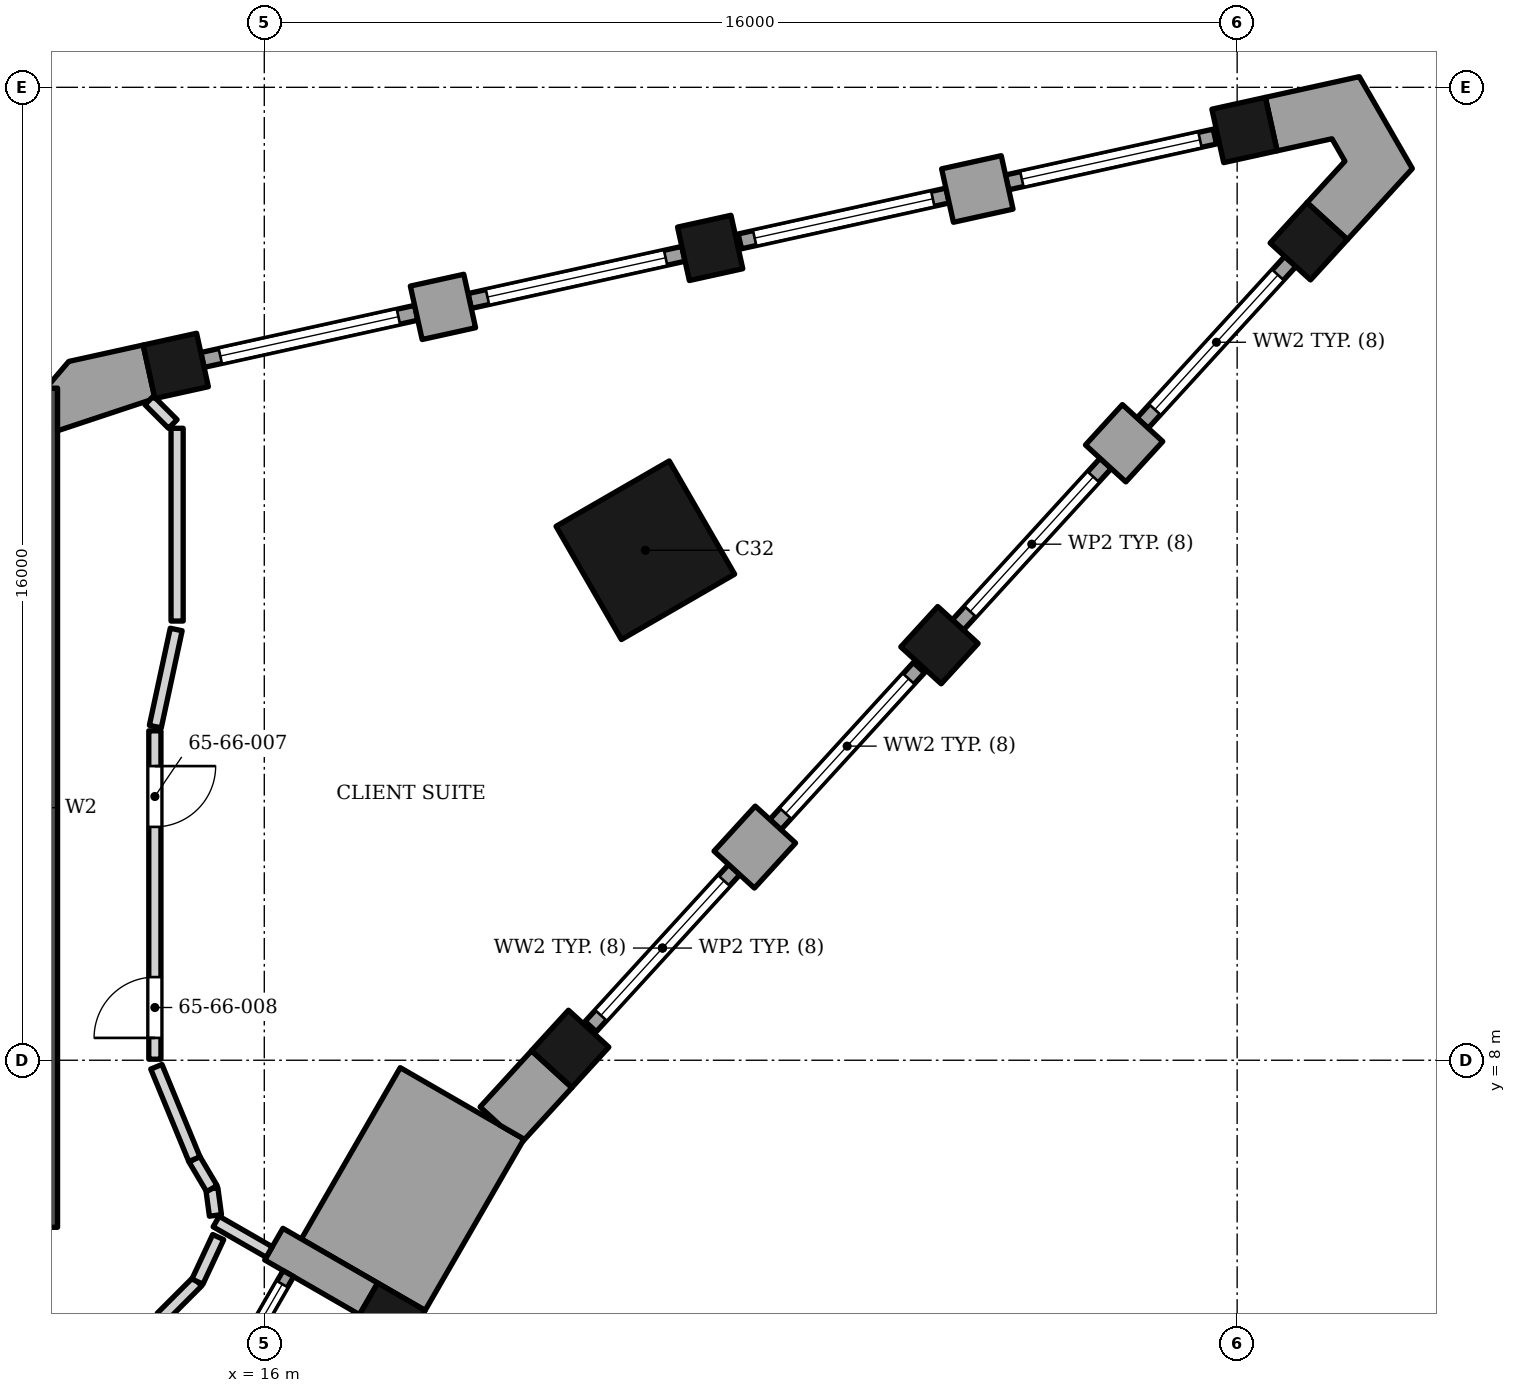
"""IFC4 building model, lengths in metres.
Left out: names, types, materials, properties, quantities, classifications, styles, units other than length and angle.
Written with IfcOpenShell. Run it as: python <this file> out.ifc"""

import sys

from ifc_helpers import new_model, si_unit, direction, frame, frame_2d, origin, origin_2d, place, context, subcontext, project, spatial, polyline, rectangle, outline, extrude, element, fill, save


model = new_model("IFC4")
c1 = context("Model", 3, precision=1e-05, world=origin(), true_north=direction((0.0, 1.0)))
c2 = subcontext(c1, "Body", "Model", "MODEL_VIEW")
j1 = project(units=[si_unit("LENGTHUNIT", "METRE"), si_unit("PLANEANGLEUNIT", "RADIAN")], contexts=[c1])
p1 = place(None, origin())
s1 = spatial("IfcSite", under=j1, at=p1, CompositionType="ELEMENT")
p2 = place(p1, origin())
s2 = spatial("IfcBuilding", under=s1, at=p2, CompositionType="ELEMENT")
p3 = place(p2, frame((0.0, 0.0, 271.6)))
s3 = spatial("IfcBuildingStorey", under=s2, at=p3, CompositionType="ELEMENT", Elevation=271.6)
p4 = place(p3, frame((12.35, 5.253, 0.0), z_axis=(0.0, 0.0, 1.0), x_axis=(0.0, 1.0, 0.0)))
e1 = element("IfcWall", 1, at=p4, inside=s3, PredefinedType="SHEAR", context=c2, shape_type="SweptSolid", body=[
    extrude(rectangle(XDim=13.8, YDim=0.5, at=frame_2d((6.9, 0.0))), origin(), (0.0, 0.0, 1.0), 3.9),
])
p5 = place(p3, frame((22.267, 16.387, 0.0), z_axis=(0.0, 0.0, 1.0), x_axis=(-0.866025412511, -0.499999984885, 0.0)))
e2 = element("IfcColumn", 2, at=p5, inside=s3, PredefinedType="COLUMN", context=c2, shape_type="SweptSolid", body=[
    extrude(rectangle(XDim=2.15, YDim=2.15, at=origin_2d()), origin(), (0.0, 0.0, 1.0), 3.9),
])
for number, where, z_axis, x_axis in (
    (3, (18.03, 3.721, 0.0), (0.0, 0.0, 1.0), (0.5, 0.866, 0.0)),
    (4, (21.031, 8.187, 0.0), (0.0, 0.0, 1.0), (0.675, 0.738, 0.0)),
    (5, (27.104, 14.826, 0.0), (0.0, 0.0, 1.0), (0.675, 0.738, 0.0)),
    (6, (33.178, 21.468, 0.0), (0.0, 0.0, 1.0), (0.675, 0.738, 0.0)),
    (7, (32.121, 23.298, 0.0), (0.0, 0.0, 1.0), (-0.977, -0.215, 0.0)),
    (8, (23.333, 21.359, 0.0), (0.0, 0.0, 1.0), (-0.977, -0.215, 0.0)),
    (9, (14.544, 19.419, 0.0), (0.0, 0.0, 1.0), (-0.977, -0.215, 0.0)),
):
    element("IfcColumn", number, at=place(p3, frame(where, z_axis=z_axis, x_axis=x_axis)), inside=s3, PredefinedType="COLUMN", context=c2, shape_type="SweptSolid", body=[
        extrude(rectangle(XDim=0.9, YDim=0.9, at=origin_2d()), origin(), (0.0, 0.0, 1.0), 3.9),
    ])
p6 = place(p3, frame((17.715, 4.076, 0.0), z_axis=(0.0, 0.0, 1.0), x_axis=(-0.866047807691, 0.499961193289, 0.0)))
e10 = element("IfcWall", 10, at=p6, inside=s3, PredefinedType="SOLIDWALL", context=c2, shape_type="SweptSolid", body=[
    extrude(rectangle(XDim=1.8, YDim=0.6, at=frame_2d((0.9, 0.0))), origin(), (0.0, 0.0, 1.0), 2.95),
])
p7 = place(p3, frame((14.296, 0.854, 0.0), z_axis=(0.0, 0.0, 1.0), x_axis=(0.499958946799, 0.866049104564, 0.0)))
e11 = element("IfcWall", 11, at=p7, inside=s3, PredefinedType="ELEMENTEDWALL", context=c2, shape_type="SweptSolid", body=[
    extrude(rectangle(XDim=4.2, YDim=0.2, at=frame_2d((2.1, 0.0))), origin(), (0.0, 0.0, 1.0), 2.95),
])
p8 = place(p7, frame((0.2, 0.0, 0.45)))
e12 = element("IfcOpeningElement", 12, at=p8, cuts=e11, PredefinedType="OPENING", context=c2, shape_type="SweptSolid", body=[
    extrude(rectangle(XDim=3.8, YDim=2.25, at=frame_2d((1.9, 1.125))), frame((0.0, 0.11, 0.0), z_axis=(0.0, -1.0, 0.0), x_axis=(1.0, 0.0, 0.0)), (0.0, 0.0, 1.0), 0.22),
])
p9 = place(p3, origin())
e13 = element("IfcWall", 13, at=p9, inside=s3, PredefinedType="SOLIDWALL", context=c2, shape_type="SweptSolid", body=[
    extrude(outline(polyline([(18.236, 7.878), (16.609, 5.061), (18.645, 3.886), (20.271, 6.703), (18.236, 7.878)])), origin(), (0.0, 0.0, 1.0), 2.973),
])
p10 = place(p3, frame((23.729, 11.135, 0.0), z_axis=(0.0, 0.0, 1.0), x_axis=(0.674788120713, 0.738011512203, 0.0)))
e14 = element("IfcWall", 14, at=p10, inside=s3, PredefinedType="SOLIDWALL", context=c2, shape_type="SweptSolid", body=[
    extrude(rectangle(XDim=1.004, YDim=0.9, at=frame_2d((0.502, 0.0))), origin(), (0.0, 0.0, 1.0), 3.0),
])
p11 = place(p3, frame((30.445, 18.479, 0.0), z_axis=(0.0, 0.0, 1.0), x_axis=(-0.674938051731, -0.737874397391, 0.0)))
e15 = element("IfcWall", 15, at=p11, inside=s3, PredefinedType="SOLIDWALL", context=c2, shape_type="SweptSolid", body=[
    extrude(rectangle(XDim=0.9, YDim=0.9, at=frame_2d((0.45, 0.0))), origin(), (0.0, 0.0, 1.0), 3.0),
])
p12 = place(p3, frame((21.368, 8.554, 0.0), z_axis=(0.0, 0.0, 1.0), x_axis=(0.67487449122, 0.737932531537, 0.0)))
e16 = element("IfcWall", 16, at=p12, inside=s3, PredefinedType="ELEMENTEDWALL", context=c2, shape_type="SweptSolid", body=[
    extrude(rectangle(XDim=3.5, YDim=0.25, at=frame_2d((1.75, 0.0))), origin(), (0.0, 0.0, 1.0), 3.0),
])
p13 = place(p12, frame((0.25, 0.0, 0.3)))
e17 = element("IfcOpeningElement", 17, at=p13, cuts=e16, PredefinedType="OPENING", context=c2, shape_type="SweptSolid", body=[
    extrude(rectangle(XDim=3.0, YDim=2.5, at=frame_2d((1.5, 1.25))), frame((0.0, 0.135, 0.0), z_axis=(0.0, -1.0, 0.0), x_axis=(1.0, 0.0, 0.0)), (0.0, 0.0, 1.0), 0.27),
])
p14 = place(p3, frame((24.405, 11.875, 0.0), z_axis=(0.0, 0.0, 1.0), x_axis=(0.67487449122, 0.737932531537, 0.0)))
e18 = element("IfcWall", 18, at=p14, inside=s3, PredefinedType="ELEMENTEDWALL", context=c2, shape_type="SweptSolid", body=[
    extrude(rectangle(XDim=3.5, YDim=0.25, at=frame_2d((1.75, 0.0))), origin(), (0.0, 0.0, 1.0), 3.0),
])
p15 = place(p14, frame((0.25, 0.0, 0.3)))
e19 = element("IfcOpeningElement", 19, at=p15, cuts=e18, PredefinedType="OPENING", context=c2, shape_type="SweptSolid", body=[
    extrude(rectangle(XDim=3.0, YDim=2.5, at=frame_2d((1.5, 1.25))), frame((0.0, 0.135, 0.0), z_axis=(0.0, -1.0, 0.0), x_axis=(1.0, 0.0, 0.0)), (0.0, 0.0, 1.0), 0.27),
])
p16 = place(p3, frame((27.408, 15.158, 0.0), z_axis=(0.0, 0.0, 1.0), x_axis=(0.674833575111, 0.737969949187, 0.0)))
e20 = element("IfcWall", 20, at=p16, inside=s3, PredefinedType="ELEMENTEDWALL", context=c2, shape_type="SweptSolid", body=[
    extrude(rectangle(XDim=3.6, YDim=0.25, at=frame_2d((1.8, 0.0))), origin(), (0.0, 0.0, 1.0), 3.0),
])
p17 = place(p16, frame((0.3, 0.0, 0.3)))
e21 = element("IfcOpeningElement", 21, at=p17, cuts=e20, PredefinedType="OPENING", context=c2, shape_type="SweptSolid", body=[
    extrude(rectangle(XDim=3.0, YDim=2.5, at=frame_2d((1.5, 1.25))), frame((0.0, 0.135, 0.0), z_axis=(0.0, -1.0, 0.0), x_axis=(1.0, 0.0, 0.0)), (0.0, 0.0, 1.0), 0.27),
])
p18 = place(p3, frame((30.445, 18.479, 0.0), z_axis=(0.0, 0.0, 1.0), x_axis=(0.674833575111, 0.737969949187, 0.0)))
e22 = element("IfcWall", 22, at=p18, inside=s3, PredefinedType="ELEMENTEDWALL", context=c2, shape_type="SweptSolid", body=[
    extrude(rectangle(XDim=3.6, YDim=0.25, at=frame_2d((1.8, 0.0))), origin(), (0.0, 0.0, 1.0), 3.0),
])
p19 = place(p18, frame((0.3, 0.0, 0.3)))
e23 = element("IfcOpeningElement", 23, at=p19, cuts=e22, PredefinedType="OPENING", context=c2, shape_type="SweptSolid", body=[
    extrude(rectangle(XDim=3.0, YDim=2.5, at=frame_2d((1.5, 1.25))), frame((0.0, 0.135, 0.0), z_axis=(0.0, -1.0, 0.0), x_axis=(1.0, 0.0, 0.0)), (0.0, 0.0, 1.0), 0.27),
])
p20 = place(p3, frame((28.217, 22.436, 0.0), z_axis=(0.0, 0.0, 1.0), x_axis=(-0.97656888558, -0.215205045752, 0.0)))
e24 = element("IfcWall", 24, at=p20, inside=s3, PredefinedType="SOLIDWALL", context=c2, shape_type="SweptSolid", body=[
    extrude(rectangle(XDim=1.004, YDim=0.9, at=frame_2d((0.502, 0.0))), origin(), (0.0, 0.0, 1.0), 3.0),
])
p21 = place(p3, frame((18.499, 20.292, 0.0), z_axis=(0.0, 0.0, 1.0), x_axis=(0.976473402733, 0.215637876437, 0.0)))
e25 = element("IfcWall", 25, at=p21, inside=s3, PredefinedType="SOLIDWALL", context=c2, shape_type="SweptSolid", body=[
    extrude(rectangle(XDim=0.9, YDim=0.9, at=frame_2d((0.45, 0.0))), origin(), (0.0, 0.0, 1.0), 3.0),
])
p22 = place(p3, frame((31.633, 23.19, 0.0), z_axis=(0.0, 0.0, 1.0), x_axis=(-0.976509313763, -0.215475196101, 0.0)))
e26 = element("IfcWall", 26, at=p22, inside=s3, PredefinedType="ELEMENTEDWALL", context=c2, shape_type="SweptSolid", body=[
    extrude(rectangle(XDim=3.5, YDim=0.25, at=frame_2d((1.75, 0.0))), origin(), (0.0, 0.0, 1.0), 3.0),
])
p23 = place(p22, frame((0.25, 0.0, 0.3)))
e27 = element("IfcOpeningElement", 27, at=p23, cuts=e26, PredefinedType="OPENING", context=c2, shape_type="SweptSolid", body=[
    extrude(rectangle(XDim=3.0, YDim=2.5, at=frame_2d((1.5, 1.25))), frame((0.0, 0.135, 0.0), z_axis=(0.0, -1.0, 0.0), x_axis=(1.0, 0.0, 0.0)), (0.0, 0.0, 1.0), 0.27),
])
p24 = place(p3, frame((27.239, 22.22, 0.0), z_axis=(0.0, 0.0, 1.0), x_axis=(-0.976509313763, -0.215475196101, 0.0)))
e28 = element("IfcWall", 28, at=p24, inside=s3, PredefinedType="ELEMENTEDWALL", context=c2, shape_type="SweptSolid", body=[
    extrude(rectangle(XDim=3.5, YDim=0.25, at=frame_2d((1.75, 0.0))), origin(), (0.0, 0.0, 1.0), 3.0),
])
p25 = place(p24, frame((0.25, 0.0, 0.3)))
e29 = element("IfcOpeningElement", 29, at=p25, cuts=e28, PredefinedType="OPENING", context=c2, shape_type="SweptSolid", body=[
    extrude(rectangle(XDim=3.0, YDim=2.5, at=frame_2d((1.5, 1.25))), frame((0.0, 0.135, 0.0), z_axis=(0.0, -1.0, 0.0), x_axis=(1.0, 0.0, 0.0)), (0.0, 0.0, 1.0), 0.27),
])
p26 = place(p3, frame((22.893, 21.262, 0.0), z_axis=(0.0, 0.0, 1.0), x_axis=(-0.976513072969, -0.215458159096, 0.0)))
e30 = element("IfcWall", 30, at=p26, inside=s3, PredefinedType="ELEMENTEDWALL", context=c2, shape_type="SweptSolid", body=[
    extrude(rectangle(XDim=3.6, YDim=0.25, at=frame_2d((1.8, 0.0))), origin(), (0.0, 0.0, 1.0), 3.0),
])
p27 = place(p26, frame((0.3, 0.0, 0.3)))
e31 = element("IfcOpeningElement", 31, at=p27, cuts=e30, PredefinedType="OPENING", context=c2, shape_type="SweptSolid", body=[
    extrude(rectangle(XDim=3.0, YDim=2.5, at=frame_2d((1.5, 1.25))), frame((0.0, 0.135, 0.0), z_axis=(0.0, -1.0, 0.0), x_axis=(1.0, 0.0, 0.0)), (0.0, 0.0, 1.0), 0.27),
])
p28 = place(p3, frame((18.499, 20.292, 0.0), z_axis=(0.0, 0.0, 1.0), x_axis=(-0.976513072969, -0.215458159096, 0.0)))
e32 = element("IfcWall", 32, at=p28, inside=s3, PredefinedType="ELEMENTEDWALL", context=c2, shape_type="SweptSolid", body=[
    extrude(rectangle(XDim=3.6, YDim=0.25, at=frame_2d((1.8, 0.0))), origin(), (0.0, 0.0, 1.0), 3.0),
])
p29 = place(p28, frame((0.3, 0.0, 0.3)))
e33 = element("IfcOpeningElement", 33, at=p29, cuts=e32, PredefinedType="OPENING", context=c2, shape_type="SweptSolid", body=[
    extrude(rectangle(XDim=3.0, YDim=2.5, at=frame_2d((1.5, 1.25))), frame((0.0, 0.135, 0.0), z_axis=(0.0, -1.0, 0.0), x_axis=(1.0, 0.0, 0.0)), (0.0, 0.0, 1.0), 0.27),
])
p30 = place(p3, origin())
e34 = element("IfcWall", 34, at=p30, inside=s3, PredefinedType="SOLIDWALL", context=c2, shape_type="SweptSolid", body=[
    extrude(outline(polyline([(20.395, 8.156), (19.549, 7.232), (19.881, 6.928), (20.271, 6.703), (20.247, 6.661), (21.059, 7.549), (20.395, 8.156)])), origin(), (0.0, 0.0, 1.0), 3.0),
])
p31 = place(p3, origin())
e35 = element("IfcWall", 35, at=p31, inside=s3, PredefinedType="SOLIDWALL", context=c2, shape_type="SweptSolid", body=[
    extrude(outline(polyline([(33.814, 21.496), (34.882, 22.664), (34.009, 24.175), (32.464, 23.834), (32.658, 22.955), (33.559, 23.154), (33.772, 22.785), (33.15, 22.104), (33.814, 21.496)])), origin(), (0.0, 0.0, 1.0), 3.0),
])
p32 = place(p3, origin())
e36 = element("IfcWall", 36, at=p32, inside=s3, PredefinedType="SOLIDWALL", context=c2, shape_type="SweptSolid", body=[
    extrude(outline(polyline([(14.201, 18.883), (14.008, 19.762), (12.784, 19.492), (12.41, 19.052), (12.6, 19.052), (12.6, 18.352), (14.201, 18.883)])), origin(), (0.0, 0.0, 1.0), 3.0),
])
p33 = place(p3, frame((14.311, 3.77, 0.0), z_axis=(0.0, 0.0, 1.0), x_axis=(0.707106781187, 0.707106781187, 0.0)))
e37 = element("IfcWall", 37, at=p33, inside=s3, PredefinedType="PARTITIONING", context=c2, shape_type="SweptSolid", body=[
    extrude(rectangle(XDim=0.834, YDim=0.2, at=frame_2d((0.417, 0.0))), origin(), (0.0, 0.0, 1.0), 3.73),
])
p34 = place(p3, frame((15.209, 5.348, 0.0), z_axis=(0.0, 0.0, 1.0), x_axis=(0.866911543868, -0.498462009695, 0.0)))
e38 = element("IfcWall", 38, at=p34, inside=s3, PredefinedType="PARTITIONING", context=c2, shape_type="SweptSolid", body=[
    extrude(rectangle(XDim=1.007, YDim=0.2, at=frame_2d((0.503, 0.0))), origin(), (0.0, 0.0, 1.0), 2.95),
])
p35 = place(p3, frame((14.9, 4.36, 0.0), z_axis=(0.0, 0.0, 1.0), x_axis=(0.423249280481, 0.906013270638, 0.0)))
e39 = element("IfcWall", 39, at=p35, inside=s3, PredefinedType="PARTITIONING", context=c2, shape_type="SweptSolid", body=[
    extrude(rectangle(XDim=0.808, YDim=0.2, at=frame_2d((0.404, 0.0))), origin(), (0.0, 0.0, 1.0), 2.95),
])
p36 = place(p3, frame((15.137, 5.889, 0.0), z_axis=(0.0, 0.0, 1.0), x_axis=(0.133422383108, -0.991059265476, 0.0)))
e40 = element("IfcWall", 40, at=p36, inside=s3, PredefinedType="PARTITIONING", context=c2, shape_type="SweptSolid", body=[
    extrude(rectangle(XDim=0.445, YDim=0.2, at=frame_2d((0.222, 0.0))), origin(), (0.0, 0.0, 1.0), 3.73),
])
p37 = place(p3, frame((14.851, 6.374, 0.0), z_axis=(0.0, 0.0, 1.0), x_axis=(0.509576505793, -0.860425351058, 0.0)))
e41 = element("IfcWall", 41, at=p37, inside=s3, PredefinedType="PARTITIONING", context=c2, shape_type="SweptSolid", body=[
    extrude(rectangle(XDim=0.563, YDim=0.2, at=frame_2d((0.281, 0.0))), origin(), (0.0, 0.0, 1.0), 3.73),
])
p38 = place(p3, frame((14.225, 7.893, 0.0), z_axis=(0.0, 0.0, 1.0), x_axis=(0.380697489052, -0.924699638709, 0.0)))
e42 = element("IfcWall", 42, at=p38, inside=s3, PredefinedType="PARTITIONING", context=c2, shape_type="SweptSolid", body=[
    extrude(rectangle(XDim=1.643, YDim=0.2, at=frame_2d((0.822, 0.0))), origin(), (0.0, 0.0, 1.0), 3.73),
])
p39 = place(p3, frame((14.2, 8.017, 0.0), z_axis=(0.0, 0.0, 1.0), x_axis=(0.0, 1.0, 0.0)))
e43 = element("IfcWall", 43, at=p39, inside=s3, PredefinedType="PARTITIONING", context=c2, shape_type="SweptSolid", body=[
    extrude(rectangle(XDim=5.4, YDim=0.2, at=frame_2d((2.7, 0.0))), origin(), (0.0, 0.0, 1.0), 3.73),
])
p40 = place(p39, frame((3.82, 0.0, 0.0)))
e44 = element("IfcOpeningElement", 44, at=p40, cuts=e43, PredefinedType="OPENING", context=c2, shape_type="SweptSolid", body=[
    extrude(rectangle(XDim=1.0, YDim=2.1, at=frame_2d((0.5, 1.05))), frame((0.0, 0.11, 0.0), z_axis=(0.0, -1.0, 0.0), x_axis=(1.0, 0.0, 0.0)), (0.0, 0.0, 1.0), 0.22),
])
p41 = place(p39, frame((0.35, 0.0, 0.0)))
e45 = element("IfcOpeningElement", 45, at=p41, cuts=e43, PredefinedType="OPENING", context=c2, shape_type="SweptSolid", body=[
    extrude(rectangle(XDim=1.0, YDim=2.1, at=frame_2d((0.5, 1.05))), frame((0.0, 0.11, 0.0), z_axis=(0.0, -1.0, 0.0), x_axis=(1.0, 0.0, 0.0)), (0.0, 0.0, 1.0), 0.22),
])
p42 = place(p3, frame((14.208, 13.487, 0.0), z_axis=(0.0, 0.0, 1.0), x_axis=(0.210294567168, 0.977638069543, 0.0)))
e46 = element("IfcWall", 46, at=p42, inside=s3, PredefinedType="PARTITIONING", context=c2, shape_type="SweptSolid", body=[
    extrude(rectangle(XDim=1.634, YDim=0.2, at=frame_2d((0.817, 0.0))), origin(), (0.0, 0.0, 1.0), 3.73),
])
p43 = place(p3, frame((14.566, 18.393, 0.0), z_axis=(0.0, 0.0, 1.0), x_axis=(0.0, -1.0, 0.0)))
e47 = element("IfcWall", 47, at=p43, inside=s3, PredefinedType="PARTITIONING", context=c2, shape_type="SweptSolid", body=[
    extrude(rectangle(XDim=3.17, YDim=0.2, at=frame_2d((1.585, 0.0))), origin(), (0.0, 0.0, 1.0), 3.73),
])
p44 = place(p3, frame((14.107, 18.852, 0.0), z_axis=(0.0, 0.0, 1.0), x_axis=(0.707106781187, -0.707106781187, 0.0)))
e48 = element("IfcWall", 48, at=p44, inside=s3, PredefinedType="PARTITIONING", context=c2, shape_type="SweptSolid", body=[
    extrude(rectangle(XDim=0.549, YDim=0.2, at=frame_2d((0.275, 0.0))), origin(), (0.0, 0.0, 1.0), 3.73),
])
p45 = place(p8, origin())
e49 = element("IfcWindow", 49, at=p45, inside=s3, PartitioningType="SINGLE_PANEL", PredefinedType="WINDOW", context=c2, shape_type="SweptSolid", body=[
    extrude(rectangle(XDim=3.8, YDim=2.25, at=frame_2d((1.9, 1.125))), frame((0.0, 0.03, 0.0), z_axis=(0.0, -1.0, 0.0), x_axis=(1.0, 0.0, 0.0)), (0.0, 0.0, 1.0), 0.06),
])
fill(e12, e49)
p46 = place(p13, origin())
e50 = element("IfcWindow", 50, at=p46, inside=s3, PartitioningType="SINGLE_PANEL", PredefinedType="WINDOW", context=c2, shape_type="SweptSolid", body=[
    extrude(rectangle(XDim=3.0, YDim=2.5, at=frame_2d((1.5, 1.25))), frame((0.0, 0.03, 0.0), z_axis=(0.0, -1.0, 0.0), x_axis=(1.0, 0.0, 0.0)), (0.0, 0.0, 1.0), 0.06),
])
fill(e17, e50)
p47 = place(p15, origin())
e51 = element("IfcWindow", 51, at=p47, inside=s3, PartitioningType="SINGLE_PANEL", PredefinedType="WINDOW", context=c2, shape_type="SweptSolid", body=[
    extrude(rectangle(XDim=3.0, YDim=2.5, at=frame_2d((1.5, 1.25))), frame((0.0, 0.03, 0.0), z_axis=(0.0, -1.0, 0.0), x_axis=(1.0, 0.0, 0.0)), (0.0, 0.0, 1.0), 0.06),
])
fill(e19, e51)
p48 = place(p17, origin())
e52 = element("IfcWindow", 52, at=p48, inside=s3, PartitioningType="SINGLE_PANEL", PredefinedType="WINDOW", context=c2, shape_type="SweptSolid", body=[
    extrude(rectangle(XDim=3.0, YDim=2.5, at=frame_2d((1.5, 1.25))), frame((0.0, 0.03, 0.0), z_axis=(0.0, -1.0, 0.0), x_axis=(1.0, 0.0, 0.0)), (0.0, 0.0, 1.0), 0.06),
])
fill(e21, e52)
p49 = place(p19, origin())
e53 = element("IfcWindow", 53, at=p49, inside=s3, PartitioningType="SINGLE_PANEL", PredefinedType="WINDOW", context=c2, shape_type="SweptSolid", body=[
    extrude(rectangle(XDim=3.0, YDim=2.5, at=frame_2d((1.5, 1.25))), frame((0.0, 0.03, 0.0), z_axis=(0.0, -1.0, 0.0), x_axis=(1.0, 0.0, 0.0)), (0.0, 0.0, 1.0), 0.06),
])
fill(e23, e53)
p50 = place(p23, origin())
e54 = element("IfcWindow", 54, at=p50, inside=s3, PartitioningType="SINGLE_PANEL", PredefinedType="WINDOW", context=c2, shape_type="SweptSolid", body=[
    extrude(rectangle(XDim=3.0, YDim=2.5, at=frame_2d((1.5, 1.25))), frame((0.0, 0.03, 0.0), z_axis=(0.0, -1.0, 0.0), x_axis=(1.0, 0.0, 0.0)), (0.0, 0.0, 1.0), 0.06),
])
fill(e27, e54)
p51 = place(p25, origin())
e55 = element("IfcWindow", 55, at=p51, inside=s3, PartitioningType="SINGLE_PANEL", PredefinedType="WINDOW", context=c2, shape_type="SweptSolid", body=[
    extrude(rectangle(XDim=3.0, YDim=2.5, at=frame_2d((1.5, 1.25))), frame((0.0, 0.03, 0.0), z_axis=(0.0, -1.0, 0.0), x_axis=(1.0, 0.0, 0.0)), (0.0, 0.0, 1.0), 0.06),
])
fill(e29, e55)
p52 = place(p27, origin())
e56 = element("IfcWindow", 56, at=p52, inside=s3, PartitioningType="SINGLE_PANEL", PredefinedType="WINDOW", context=c2, shape_type="SweptSolid", body=[
    extrude(rectangle(XDim=3.0, YDim=2.5, at=frame_2d((1.5, 1.25))), frame((0.0, 0.03, 0.0), z_axis=(0.0, -1.0, 0.0), x_axis=(1.0, 0.0, 0.0)), (0.0, 0.0, 1.0), 0.06),
])
fill(e31, e56)
p53 = place(p29, origin())
e57 = element("IfcWindow", 57, at=p53, inside=s3, PartitioningType="SINGLE_PANEL", PredefinedType="WINDOW", context=c2, shape_type="SweptSolid", body=[
    extrude(rectangle(XDim=3.0, YDim=2.5, at=frame_2d((1.5, 1.25))), frame((0.0, 0.03, 0.0), z_axis=(0.0, -1.0, 0.0), x_axis=(1.0, 0.0, 0.0)), (0.0, 0.0, 1.0), 0.06),
])
fill(e33, e57)
p54 = place(p40, origin())
e58 = element("IfcDoor", 58, at=p54, inside=s3, OperationType="SINGLE_SWING_RIGHT", PredefinedType="DOOR", context=c2, shape_type="SweptSolid", body=[
    extrude(rectangle(XDim=1.0, YDim=2.1, at=frame_2d((0.5, 1.05))), frame((0.0, 0.025, 0.0), z_axis=(0.0, -1.0, 0.0), x_axis=(1.0, 0.0, 0.0)), (0.0, 0.0, 1.0), 0.05),
])
fill(e44, e58)
p55 = place(p41, origin())
e59 = element("IfcDoor", 59, at=p55, inside=s3, OperationType="SINGLE_SWING_LEFT", PredefinedType="DOOR", context=c2, shape_type="SweptSolid", body=[
    extrude(rectangle(XDim=1.0, YDim=2.1, at=frame_2d((0.5, 1.05))), frame((0.0, 0.025, 0.0), z_axis=(0.0, -1.0, 0.0), x_axis=(1.0, 0.0, 0.0)), (0.0, 0.0, 1.0), 0.05),
])
fill(e45, e59)
save(model, sys.argv[1])
